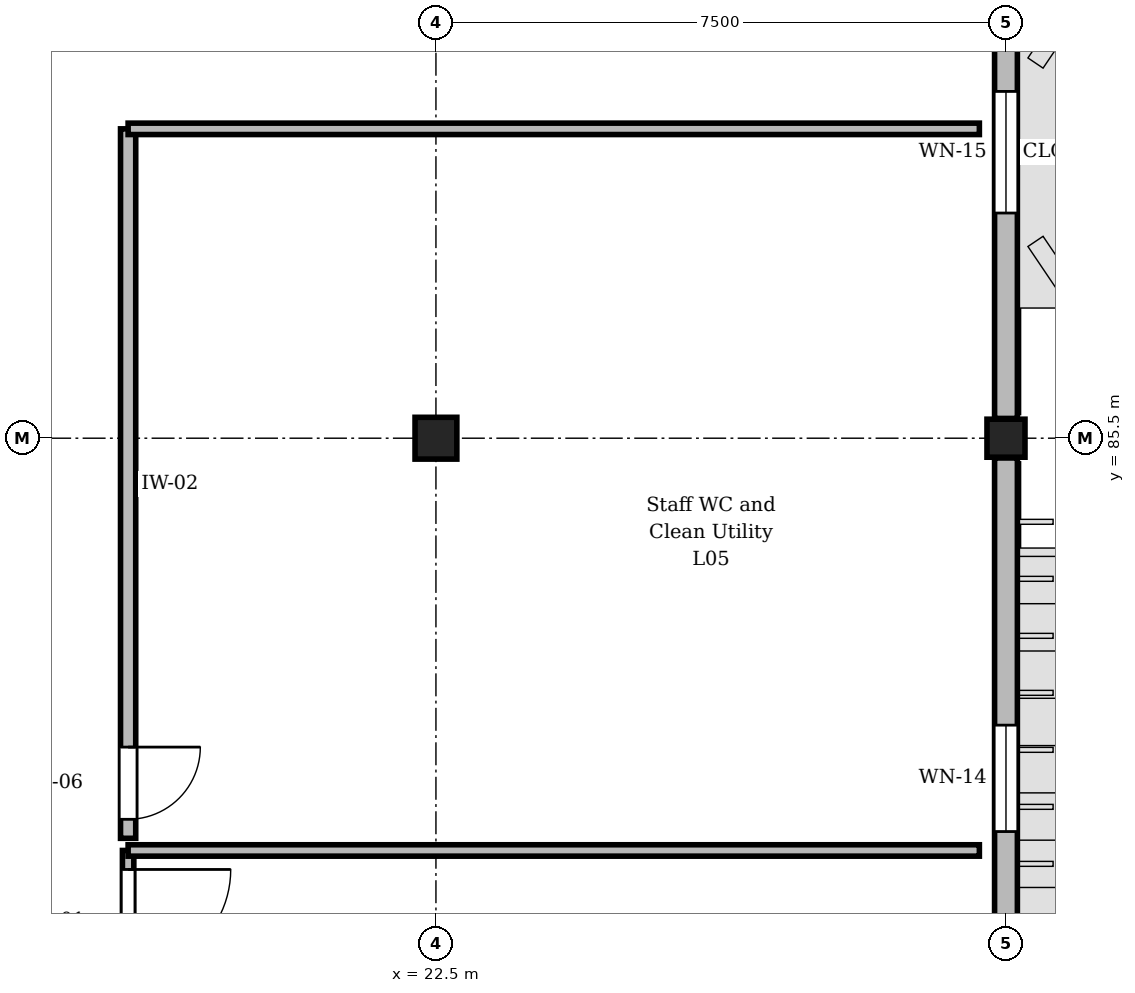
"""IFC4 building model, lengths in metres.
Left out: names, types, materials, properties, quantities, classifications, styles, units other than length and angle.
Written with IfcOpenShell. Run it as: python <this file> out.ifc"""

import sys

from ifc_helpers import new_model, si_unit, direction, frame, frame_2d, origin, origin_2d, place, context, subcontext, project, spatial, rectangle, extrude, element, fill, save


model = new_model("IFC4")
c1 = context("Model", 3, precision=1e-05, world=origin(), true_north=direction((0.0, 1.0)))
c2 = subcontext(c1, "Body", "Model", "MODEL_VIEW")
j1 = project(units=[si_unit("LENGTHUNIT", "METRE"), si_unit("PLANEANGLEUNIT", "RADIAN")], contexts=[c1])
p1 = place(None, origin())
s1 = spatial("IfcSite", under=j1, at=p1, CompositionType="ELEMENT")
p2 = place(p1, origin())
s2 = spatial("IfcBuilding", under=s1, at=p2, CompositionType="ELEMENT")
p3 = place(p2, frame((0.0, 0.0, 21.9)))
s3 = spatial("IfcBuildingStorey", under=s2, at=p3, CompositionType="ELEMENT", Elevation=21.9)
p4 = place(p3, frame((22.5, 85.5, 0.0), z_axis=(0.0, 0.0, 1.0), x_axis=(1.0, 0.0, 0.0)))
e1 = element("IfcColumn", 1, at=p4, inside=s3, PredefinedType="COLUMN", context=c2, shape_type="SweptSolid", body=[
    extrude(rectangle(XDim=0.55, YDim=0.55, at=origin_2d()), origin(), (0.0, 0.0, 1.0), 4.05),
])
p5 = place(p3, frame((30.0, 85.5, 0.0), z_axis=(0.0, 0.0, 1.0), x_axis=(1.0, 0.0, 0.0)))
e2 = element("IfcColumn", 2, at=p5, inside=s3, PredefinedType="COLUMN", context=c2, shape_type="SweptSolid", body=[
    extrude(rectangle(XDim=0.5, YDim=0.5, at=origin_2d()), origin(), (0.0, 0.0, 1.0), 4.05),
])
p6 = place(p3, frame((30.0, 85.24, 0.0), z_axis=(0.0, 0.0, 1.0), x_axis=(0.0, -1.0, 0.0)))
e3 = element("IfcWall", 3, at=p6, inside=s3, PredefinedType="STANDARD", context=c2, shape_type="SweptSolid", body=[
    extrude(rectangle(XDim=8.43, YDim=0.3, at=frame_2d((4.215, 0.0))), origin(), (0.0, 0.0, 1.0), 3.22),
])
p7 = place(p6, frame((3.515, 0.0, 0.9)))
e4 = element("IfcOpeningElement", 4, at=p7, cuts=e3, PredefinedType="OPENING", context=c2, shape_type="SweptSolid", body=[
    extrude(rectangle(XDim=1.4, YDim=1.8, at=frame_2d((0.7, 0.9))), frame((0.0, 0.16, 0.0), z_axis=(0.0, -1.0, 0.0), x_axis=(1.0, 0.0, 0.0)), (0.0, 0.0, 1.0), 0.32),
])
p8 = place(p3, frame((30.0, 92.765, 0.0), z_axis=(0.0, 0.0, 1.0), x_axis=(0.0, -1.0, 0.0)))
e5 = element("IfcWall", 5, at=p8, inside=s3, PredefinedType="STANDARD", context=c2, shape_type="SweptSolid", body=[
    extrude(rectangle(XDim=7.005, YDim=0.3, at=frame_2d((3.502, 0.0))), origin(), (0.0, 0.0, 1.0), 3.17),
])
p9 = place(p8, frame((2.702, 0.0, 0.9)))
e6 = element("IfcOpeningElement", 6, at=p9, cuts=e5, PredefinedType="OPENING", context=c2, shape_type="SweptSolid", body=[
    extrude(rectangle(XDim=1.6, YDim=1.8, at=frame_2d((0.8, 0.9))), frame((0.0, 0.16, 0.0), z_axis=(0.0, -1.0, 0.0), x_axis=(1.0, 0.0, 0.0)), (0.0, 0.0, 1.0), 0.32),
])
p10 = place(p3, frame((18.45, 80.076, 0.0), z_axis=(0.0, 0.0, 1.0), x_axis=(0.0, -1.0, 0.0)))
e7 = element("IfcWall", 7, at=p10, inside=s3, PredefinedType="PARTITIONING", context=c2, shape_type="SweptSolid", body=[
    extrude(rectangle(XDim=9.334, YDim=0.15, at=frame_2d((4.667, 0.0))), origin(), (0.0, 0.0, 1.0), 3.355),
])
p11 = place(p10, frame((0.25, 0.0, 0.0)))
e8 = element("IfcOpeningElement", 8, at=p11, cuts=e7, PredefinedType="OPENING", context=c2, shape_type="SweptSolid", body=[
    extrude(rectangle(XDim=1.35, YDim=2.25, at=frame_2d((0.675, 1.125))), frame((0.0, 0.085, 0.0), z_axis=(0.0, -1.0, 0.0), x_axis=(1.0, 0.0, 0.0)), (0.0, 0.0, 1.0), 0.17),
])
p12 = place(p3, frame((18.45, 89.57, 0.0), z_axis=(0.0, 0.0, 1.0), x_axis=(0.0, -1.0, 0.0)))
e9 = element("IfcWall", 9, at=p12, inside=s3, PredefinedType="STANDARD", context=c2, shape_type="SweptSolid", body=[
    extrude(rectangle(XDim=9.334, YDim=0.2, at=frame_2d((4.667, 0.0))), origin(), (0.0, 0.0, 1.0), 3.355),
])
p13 = place(p12, frame((8.134, 0.0, 0.0)))
e10 = element("IfcOpeningElement", 10, at=p13, cuts=e9, PredefinedType="OPENING", context=c2, shape_type="SweptSolid", body=[
    extrude(rectangle(XDim=0.95, YDim=2.15, at=frame_2d((0.475, 1.075))), frame((0.0, 0.11, 0.0), z_axis=(0.0, -1.0, 0.0), x_axis=(1.0, 0.0, 0.0)), (0.0, 0.0, 1.0), 0.22),
])
for number, where, z_axis, x_axis in (
    (11, (18.45, 80.076, 0.0), (0.0, 0.0, 1.0), (1.0, 0.0, 0.0)),
    (12, (18.45, 89.57, 0.0), (0.0, 0.0, 1.0), (1.0, 0.0, 0.0)),
):
    element("IfcWall", number, at=place(p3, frame(where, z_axis=z_axis, x_axis=x_axis)), inside=s3, PredefinedType="PARTITIONING", context=c2, shape_type="SweptSolid", body=[
        extrude(rectangle(XDim=11.2, YDim=0.15, at=frame_2d((5.6, 0.0))), origin(), (0.0, 0.0, 1.0), 3.755),
    ])
p14 = place(p7, origin())
e13 = element("IfcWindow", 13, at=p14, inside=s3, PartitioningType="SINGLE_PANEL", PredefinedType="WINDOW", context=c2, shape_type="SweptSolid", body=[
    extrude(rectangle(XDim=1.4, YDim=1.8, at=frame_2d((0.7, 0.9))), frame((0.0, 0.03, 0.0), z_axis=(0.0, -1.0, 0.0), x_axis=(1.0, 0.0, 0.0)), (0.0, 0.0, 1.0), 0.06),
])
fill(e4, e13)
p15 = place(p9, origin())
e14 = element("IfcWindow", 14, at=p15, inside=s3, PartitioningType="SINGLE_PANEL", PredefinedType="WINDOW", context=c2, shape_type="SweptSolid", body=[
    extrude(rectangle(XDim=1.6, YDim=1.8, at=frame_2d((0.8, 0.9))), frame((0.0, 0.03, 0.0), z_axis=(0.0, -1.0, 0.0), x_axis=(1.0, 0.0, 0.0)), (0.0, 0.0, 1.0), 0.06),
])
fill(e6, e14)
p16 = place(p11, origin())
e15 = element("IfcDoor", 15, at=p16, inside=s3, OperationType="SINGLE_SWING_LEFT", PredefinedType="DOOR", context=c2, shape_type="SweptSolid", body=[
    extrude(rectangle(XDim=1.35, YDim=2.25, at=frame_2d((0.675, 1.125))), frame((0.0, 0.025, 0.0), z_axis=(0.0, -1.0, 0.0), x_axis=(1.0, 0.0, 0.0)), (0.0, 0.0, 1.0), 0.05),
])
fill(e8, e15)
p17 = place(p13, origin())
e16 = element("IfcDoor", 16, at=p17, inside=s3, OperationType="SINGLE_SWING_LEFT", PredefinedType="DOOR", context=c2, shape_type="SweptSolid", body=[
    extrude(rectangle(XDim=0.95, YDim=2.15, at=frame_2d((0.475, 1.075))), frame((0.0, 0.025, 0.0), z_axis=(0.0, -1.0, 0.0), x_axis=(1.0, 0.0, 0.0)), (0.0, 0.0, 1.0), 0.05),
])
fill(e10, e16)
save(model, sys.argv[1])
